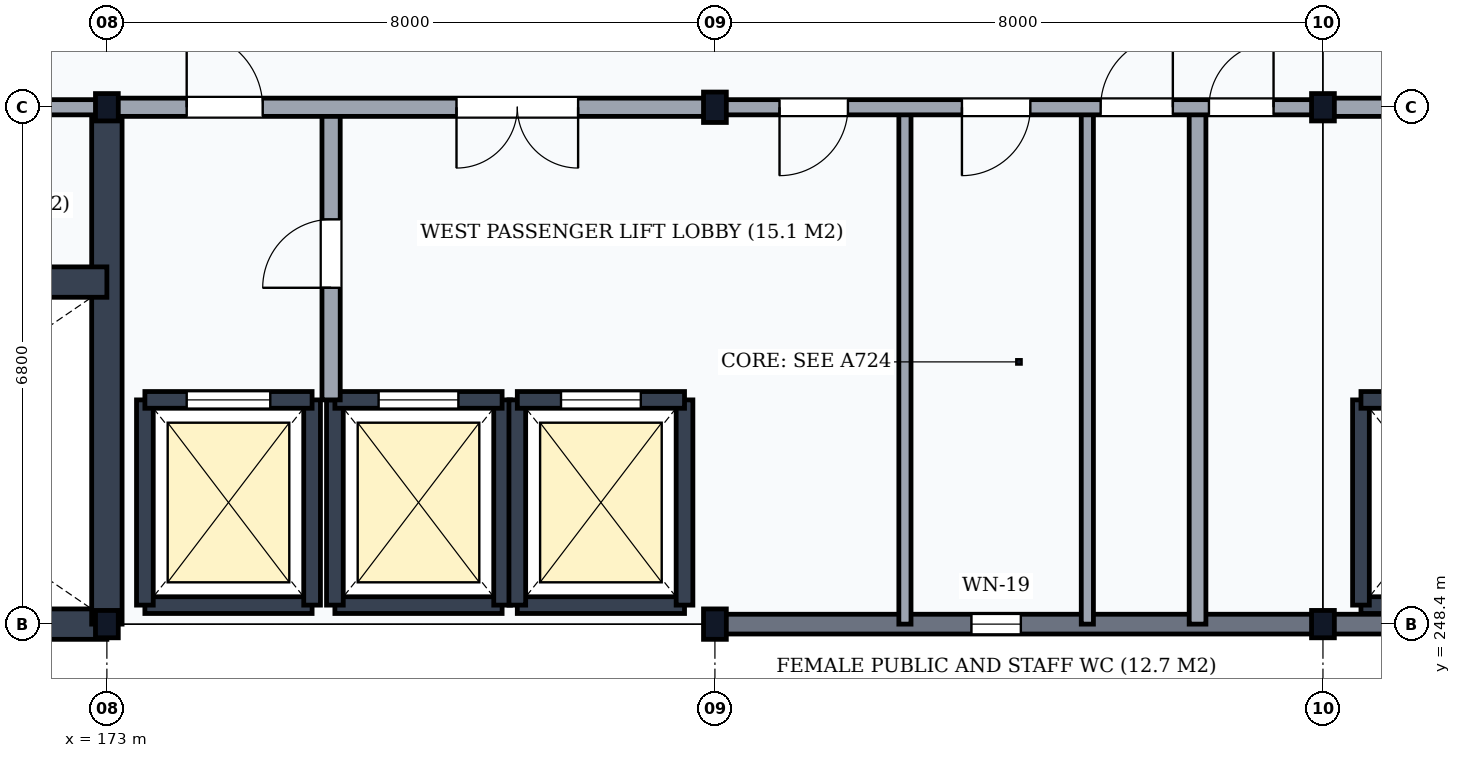
"""IFC4 building model, lengths in metres.
Left out: names, types, materials, properties, quantities, classifications, styles, units other than length and angle.
Written with IfcOpenShell. Run it as: python <this file> out.ifc"""

import sys

from ifc_helpers import new_model, si_unit, direction, frame, frame_2d, origin, origin_2d, place, context, subcontext, project, spatial, rectangle, i_section, extrude, element, fill, save


model = new_model("IFC4")
c1 = context("Model", 3, precision=1e-05, world=origin(), true_north=direction((0.0, 1.0)))
c2 = subcontext(c1, "Body", "Model", "MODEL_VIEW")
j1 = project(units=[si_unit("LENGTHUNIT", "METRE"), si_unit("PLANEANGLEUNIT", "RADIAN")], contexts=[c1])
p1 = place(None, origin())
s1 = spatial("IfcSite", under=j1, at=p1, CompositionType="ELEMENT")
p2 = place(p1, origin())
s2 = spatial("IfcBuilding", under=s1, at=p2, CompositionType="ELEMENT")
p3 = place(p2, frame((0.0, 0.0, 56.1)))
s3 = spatial("IfcBuildingStorey", under=s2, at=p3, CompositionType="ELEMENT", Elevation=56.1)
for number, where, z_axis, x_axis in (
    (1, (173.0, 248.4, 0.0), (0.0, 0.0, 1.0), (1.0, 0.0, 0.0)),
    (2, (173.0, 255.2, 0.0), (0.0, 0.0, 1.0), (1.0, 0.0, 0.0)),
):
    element("IfcColumn", number, at=place(p3, frame(where, z_axis=z_axis, x_axis=x_axis)), inside=s3, PredefinedType="COLUMN", context=c2, shape_type="SweptSolid", body=[
        extrude(i_section(OverallWidth=0.3, OverallDepth=0.36, WebThickness=0.012, FlangeThickness=0.022, FilletRadius=0.027, at=origin_2d()), origin(), (0.0, 0.0, 1.0), 3.9),
    ])
for number, where, z_axis, x_axis in (
    (3, (181.0, 248.4, 0.0), (0.0, 0.0, 1.0), (1.0, 0.0, 0.0)),
    (4, (181.0, 255.2, 0.0), (0.0, 0.0, 1.0), (1.0, 0.0, 0.0)),
):
    element("IfcColumn", number, at=place(p3, frame(where, z_axis=z_axis, x_axis=x_axis)), inside=s3, PredefinedType="COLUMN", context=c2, shape_type="SweptSolid", body=[
        extrude(i_section(OverallWidth=0.3, OverallDepth=0.4, WebThickness=0.013, FlangeThickness=0.024, FilletRadius=0.027, at=origin_2d()), origin(), (0.0, 0.0, 1.0), 3.9),
    ])
for number, where, z_axis, x_axis in (
    (5, (189.0, 248.4, 0.0), (0.0, 0.0, 1.0), (1.0, 0.0, 0.0)),
    (6, (189.0, 255.2, 0.0), (0.0, 0.0, 1.0), (1.0, 0.0, 0.0)),
):
    element("IfcColumn", number, at=place(p3, frame(where, z_axis=z_axis, x_axis=x_axis)), inside=s3, PredefinedType="COLUMN", context=c2, shape_type="SweptSolid", body=[
        extrude(i_section(OverallWidth=0.3, OverallDepth=0.36, WebThickness=0.012, FlangeThickness=0.022, FilletRadius=0.027, at=origin_2d()), origin(), (0.0, 0.0, 1.0), 3.9),
    ])
p4 = place(p3, frame((181.006, 248.4, 0.0), z_axis=(0.0, 0.0, 1.0), x_axis=(1.0, 0.0, 0.0)))
e7 = element("IfcWall", 7, at=p4, inside=s3, PredefinedType="SOLIDWALL", context=c2, shape_type="SweptSolid", body=[
    extrude(rectangle(XDim=7.988, YDim=0.26, at=frame_2d((3.994, 0.0))), origin(), (0.0, 0.0, 1.0), 3.268),
])
p5 = place(p4, frame((3.369, 0.0, 0.95)))
e8 = element("IfcOpeningElement", 8, at=p5, cuts=e7, PredefinedType="OPENING", context=c2, shape_type="SweptSolid", body=[
    extrude(rectangle(XDim=0.65, YDim=1.8, at=frame_2d((0.325, 0.9))), frame((0.0, 0.145, 0.0), z_axis=(0.0, -1.0, 0.0), x_axis=(1.0, 0.0, 0.0)), (0.0, 0.0, 1.0), 0.29),
])
p6 = place(p3, frame((189.006, 248.4, 0.0), z_axis=(0.0, 0.0, 1.0), x_axis=(1.0, 0.0, 0.0)))
e9 = element("IfcWall", 9, at=p6, inside=s3, PredefinedType="SOLIDWALL", context=c2, shape_type="SweptSolid", body=[
    extrude(rectangle(XDim=7.988, YDim=0.26, at=frame_2d((3.994, 0.0))), origin(), (0.0, 0.0, 1.0), 3.268),
])
p7 = place(p3, frame((165.0, 248.4, 0.0), z_axis=(0.0, 0.0, 1.0), x_axis=(1.0, 0.0, 0.0)))
e10 = element("IfcWall", 10, at=p7, inside=s3, PredefinedType="SHEAR", context=c2, shape_type="SweptSolid", body=[
    extrude(rectangle(XDim=8.0, YDim=0.4, at=frame_2d((4.0, 0.0))), origin(), (0.0, 0.0, 1.0), 3.58),
])
p8 = place(p3, frame((173.0, 248.4, 0.0), z_axis=(0.0, 0.0, 1.0), x_axis=(0.0, 1.0, 0.0)))
e11 = element("IfcWall", 11, at=p8, inside=s3, PredefinedType="SHEAR", context=c2, shape_type="SweptSolid", body=[
    extrude(rectangle(XDim=6.8, YDim=0.4, at=frame_2d((3.4, 0.0))), origin(), (0.0, 0.0, 1.0), 3.58),
])
p9 = place(p3, frame((165.0, 252.9, 0.0), z_axis=(0.0, 0.0, 1.0), x_axis=(1.0, 0.0, 0.0)))
e12 = element("IfcWall", 12, at=p9, inside=s3, PredefinedType="SHEAR", context=c2, shape_type="SweptSolid", body=[
    extrude(rectangle(XDim=8.0, YDim=0.4, at=frame_2d((4.0, 0.0))), origin(), (0.0, 0.0, 1.0), 3.58),
])
p10 = place(p9, frame((0.3, 0.0, 0.0)))
e13 = element("IfcOpeningElement", 13, at=p10, cuts=e12, PredefinedType="OPENING", context=c2, shape_type="SweptSolid", body=[
    extrude(rectangle(XDim=1.15, YDim=2.15, at=frame_2d((0.575, 1.075))), frame((0.0, 0.215, 0.0), z_axis=(0.0, -1.0, 0.0), x_axis=(1.0, 0.0, 0.0)), (0.0, 0.0, 1.0), 0.43),
])
p11 = place(p3, frame((165.0, 255.2, 0.0), z_axis=(0.0, 0.0, 1.0), x_axis=(1.0, 0.0, 0.0)))
e14 = element("IfcWall", 14, at=p11, inside=s3, PredefinedType="PARTITIONING", context=c2, shape_type="SweptSolid", body=[
    extrude(rectangle(XDim=8.0, YDim=0.2, at=frame_2d((4.0, 0.0))), origin(), (0.0, 0.0, 1.0), 3.028),
])
p12 = place(p11, frame((3.275, 0.0, 0.0)))
e15 = element("IfcOpeningElement", 15, at=p12, cuts=e14, PredefinedType="OPENING", context=c2, shape_type="SweptSolid", body=[
    extrude(rectangle(XDim=1.45, YDim=2.2, at=frame_2d((0.725, 1.1))), frame((0.0, 0.115, 0.0), z_axis=(0.0, -1.0, 0.0), x_axis=(1.0, 0.0, 0.0)), (0.0, 0.0, 1.0), 0.23),
])
p13 = place(p3, frame((173.5, 248.65, 0.0), z_axis=(0.0, 0.0, 1.0), x_axis=(1.0, 0.0, 0.0)))
e16 = element("IfcWall", 16, at=p13, inside=s3, PredefinedType="SHEAR", context=c2, shape_type="SweptSolid", body=[
    extrude(rectangle(XDim=2.2, YDim=0.22, at=frame_2d((1.1, 0.0))), origin(), (0.0, 0.0, 1.0), 3.58),
])
for number, where, z_axis, x_axis in (
    (17, (173.5, 248.65, 0.0), (0.0, 0.0, 1.0), (0.0, 1.0, 0.0)),
    (18, (175.7, 248.65, 0.0), (0.0, 0.0, 1.0), (0.0, 1.0, 0.0)),
):
    element("IfcWall", number, at=place(p3, frame(where, z_axis=z_axis, x_axis=x_axis)), inside=s3, PredefinedType="SHEAR", context=c2, shape_type="SweptSolid", body=[
        extrude(rectangle(XDim=2.7, YDim=0.22, at=frame_2d((1.35, 0.0))), origin(), (0.0, 0.0, 1.0), 3.58),
    ])
p14 = place(p3, frame((173.5, 251.35, 0.0), z_axis=(0.0, 0.0, 1.0), x_axis=(1.0, 0.0, 0.0)))
e19 = element("IfcWall", 19, at=p14, inside=s3, PredefinedType="SHEAR", context=c2, shape_type="SweptSolid", body=[
    extrude(rectangle(XDim=2.2, YDim=0.22, at=frame_2d((1.1, 0.0))), origin(), (0.0, 0.0, 1.0), 3.58),
])
p15 = place(p14, frame((0.55, 0.0, 0.0)))
e20 = element("IfcOpeningElement", 20, at=p15, cuts=e19, PredefinedType="OPENING", context=c2, shape_type="SweptSolid", body=[
    extrude(rectangle(XDim=1.1, YDim=2.15, at=frame_2d((0.55, 1.075))), frame((0.0, 0.125, 0.0), z_axis=(0.0, -1.0, 0.0), x_axis=(1.0, 0.0, 0.0)), (0.0, 0.0, 1.0), 0.25),
])
p16 = place(p3, frame((176.0, 248.65, 0.0), z_axis=(0.0, 0.0, 1.0), x_axis=(1.0, 0.0, 0.0)))
e21 = element("IfcWall", 21, at=p16, inside=s3, PredefinedType="SHEAR", context=c2, shape_type="SweptSolid", body=[
    extrude(rectangle(XDim=2.2, YDim=0.22, at=frame_2d((1.1, 0.0))), origin(), (0.0, 0.0, 1.0), 3.58),
])
for number, where, z_axis, x_axis in (
    (22, (176.0, 248.65, 0.0), (0.0, 0.0, 1.0), (0.0, 1.0, 0.0)),
    (23, (178.2, 248.65, 0.0), (0.0, 0.0, 1.0), (0.0, 1.0, 0.0)),
):
    element("IfcWall", number, at=place(p3, frame(where, z_axis=z_axis, x_axis=x_axis)), inside=s3, PredefinedType="SHEAR", context=c2, shape_type="SweptSolid", body=[
        extrude(rectangle(XDim=2.7, YDim=0.22, at=frame_2d((1.35, 0.0))), origin(), (0.0, 0.0, 1.0), 3.58),
    ])
p17 = place(p3, frame((176.0, 251.35, 0.0), z_axis=(0.0, 0.0, 1.0), x_axis=(1.0, 0.0, 0.0)))
e24 = element("IfcWall", 24, at=p17, inside=s3, PredefinedType="SHEAR", context=c2, shape_type="SweptSolid", body=[
    extrude(rectangle(XDim=2.2, YDim=0.22, at=frame_2d((1.1, 0.0))), origin(), (0.0, 0.0, 1.0), 3.58),
])
p18 = place(p17, frame((0.575, 0.0, 0.0)))
e25 = element("IfcOpeningElement", 25, at=p18, cuts=e24, PredefinedType="OPENING", context=c2, shape_type="SweptSolid", body=[
    extrude(rectangle(XDim=1.05, YDim=2.15, at=frame_2d((0.525, 1.075))), frame((0.0, 0.125, 0.0), z_axis=(0.0, -1.0, 0.0), x_axis=(1.0, 0.0, 0.0)), (0.0, 0.0, 1.0), 0.25),
])
p19 = place(p3, frame((178.4, 248.65, 0.0), z_axis=(0.0, 0.0, 1.0), x_axis=(1.0, 0.0, 0.0)))
e26 = element("IfcWall", 26, at=p19, inside=s3, PredefinedType="SHEAR", context=c2, shape_type="SweptSolid", body=[
    extrude(rectangle(XDim=2.2, YDim=0.22, at=frame_2d((1.1, 0.0))), origin(), (0.0, 0.0, 1.0), 3.58),
])
for number, where, z_axis, x_axis in (
    (27, (178.4, 248.65, 0.0), (0.0, 0.0, 1.0), (0.0, 1.0, 0.0)),
    (28, (180.6, 248.65, 0.0), (0.0, 0.0, 1.0), (0.0, 1.0, 0.0)),
):
    element("IfcWall", number, at=place(p3, frame(where, z_axis=z_axis, x_axis=x_axis)), inside=s3, PredefinedType="SHEAR", context=c2, shape_type="SweptSolid", body=[
        extrude(rectangle(XDim=2.7, YDim=0.22, at=frame_2d((1.35, 0.0))), origin(), (0.0, 0.0, 1.0), 3.58),
    ])
p20 = place(p3, frame((178.4, 251.35, 0.0), z_axis=(0.0, 0.0, 1.0), x_axis=(1.0, 0.0, 0.0)))
e29 = element("IfcWall", 29, at=p20, inside=s3, PredefinedType="SHEAR", context=c2, shape_type="SweptSolid", body=[
    extrude(rectangle(XDim=2.2, YDim=0.22, at=frame_2d((1.1, 0.0))), origin(), (0.0, 0.0, 1.0), 3.58),
])
p21 = place(p20, frame((0.575, 0.0, 0.0)))
e30 = element("IfcOpeningElement", 30, at=p21, cuts=e29, PredefinedType="OPENING", context=c2, shape_type="SweptSolid", body=[
    extrude(rectangle(XDim=1.05, YDim=2.15, at=frame_2d((0.525, 1.075))), frame((0.0, 0.125, 0.0), z_axis=(0.0, -1.0, 0.0), x_axis=(1.0, 0.0, 0.0)), (0.0, 0.0, 1.0), 0.25),
])
p22 = place(p3, frame((189.5, 248.65, 0.0), z_axis=(0.0, 0.0, 1.0), x_axis=(1.0, 0.0, 0.0)))
e31 = element("IfcWall", 31, at=p22, inside=s3, PredefinedType="SHEAR", context=c2, shape_type="SweptSolid", body=[
    extrude(rectangle(XDim=2.2, YDim=0.22, at=frame_2d((1.1, 0.0))), origin(), (0.0, 0.0, 1.0), 3.58),
])
p23 = place(p3, frame((189.5, 248.65, 0.0), z_axis=(0.0, 0.0, 1.0), x_axis=(0.0, 1.0, 0.0)))
e32 = element("IfcWall", 32, at=p23, inside=s3, PredefinedType="SHEAR", context=c2, shape_type="SweptSolid", body=[
    extrude(rectangle(XDim=2.7, YDim=0.22, at=frame_2d((1.35, 0.0))), origin(), (0.0, 0.0, 1.0), 3.58),
])
p24 = place(p3, frame((189.5, 251.35, 0.0), z_axis=(0.0, 0.0, 1.0), x_axis=(1.0, 0.0, 0.0)))
e33 = element("IfcWall", 33, at=p24, inside=s3, PredefinedType="SHEAR", context=c2, shape_type="SweptSolid", body=[
    extrude(rectangle(XDim=2.2, YDim=0.22, at=frame_2d((1.1, 0.0))), origin(), (0.0, 0.0, 1.0), 3.58),
])
p25 = place(p24, frame((0.55, 0.0, 0.0)))
e34 = element("IfcOpeningElement", 34, at=p25, cuts=e33, PredefinedType="OPENING", context=c2, shape_type="SweptSolid", body=[
    extrude(rectangle(XDim=1.1, YDim=2.15, at=frame_2d((0.55, 1.075))), frame((0.0, 0.125, 0.0), z_axis=(0.0, -1.0, 0.0), x_axis=(1.0, 0.0, 0.0)), (0.0, 0.0, 1.0), 0.25),
])
p26 = place(p3, frame((175.95, 251.35, 0.0), z_axis=(0.0, 0.0, 1.0), x_axis=(0.0, 1.0, 0.0)))
e35 = element("IfcWall", 35, at=p26, inside=s3, PredefinedType="PARTITIONING", context=c2, shape_type="SweptSolid", body=[
    extrude(rectangle(XDim=3.85, YDim=0.24, at=frame_2d((1.925, 0.0))), origin(), (0.0, 0.0, 1.0), 3.58),
])
p27 = place(p26, frame((1.475, 0.0, 0.0)))
e36 = element("IfcOpeningElement", 36, at=p27, cuts=e35, PredefinedType="OPENING", context=c2, shape_type="SweptSolid", body=[
    extrude(rectangle(XDim=0.9, YDim=2.1, at=frame_2d((0.45, 1.05))), frame((0.0, 0.135, 0.0), z_axis=(0.0, -1.0, 0.0), x_axis=(1.0, 0.0, 0.0)), (0.0, 0.0, 1.0), 0.27),
])
for number, where, z_axis, x_axis in (
    (37, (183.5, 248.4, 0.0), (0.0, 0.0, 1.0), (0.0, 1.0, 0.0)),
    (38, (185.9, 248.4, 0.0), (0.0, 0.0, 1.0), (0.0, 1.0, 0.0)),
):
    element("IfcWall", number, at=place(p3, frame(where, z_axis=z_axis, x_axis=x_axis)), inside=s3, PredefinedType="PARTITIONING", context=c2, shape_type="SweptSolid", body=[
        extrude(rectangle(XDim=6.8, YDim=0.16, at=frame_2d((3.4, 0.0))), origin(), (0.0, 0.0, 1.0), 3.58),
    ])
p28 = place(p3, frame((187.35, 248.4, 0.0), z_axis=(0.0, 0.0, 1.0), x_axis=(0.0, 1.0, 0.0)))
e39 = element("IfcWall", 39, at=p28, inside=s3, PredefinedType="PARTITIONING", context=c2, shape_type="SweptSolid", body=[
    extrude(rectangle(XDim=6.8, YDim=0.22, at=frame_2d((3.4, 0.0))), origin(), (0.0, 0.0, 1.0), 3.58),
])
p29 = place(p3, frame((173.0, 255.2, 0.0), z_axis=(0.0, 0.0, 1.0), x_axis=(1.0, 0.0, 0.0)))
e40 = element("IfcWall", 40, at=p29, inside=s3, PredefinedType="PARTITIONING", context=c2, shape_type="SweptSolid", body=[
    extrude(rectangle(XDim=8.0, YDim=0.24, at=frame_2d((4.0, 0.0))), origin(), (0.0, 0.0, 1.0), 3.028),
])
p30 = place(p29, frame((1.05, 0.0, 0.0)))
e41 = element("IfcOpeningElement", 41, at=p30, cuts=e40, PredefinedType="OPENING", context=c2, shape_type="SweptSolid", body=[
    extrude(rectangle(XDim=1.0, YDim=2.1, at=frame_2d((0.5, 1.05))), frame((0.0, 0.135, 0.0), z_axis=(0.0, -1.0, 0.0), x_axis=(1.0, 0.0, 0.0)), (0.0, 0.0, 1.0), 0.27),
])
p31 = place(p29, frame((4.6, 0.0, 0.0)))
e42 = element("IfcOpeningElement", 42, at=p31, cuts=e40, PredefinedType="OPENING", context=c2, shape_type="SweptSolid", body=[
    extrude(rectangle(XDim=1.6, YDim=2.25, at=frame_2d((0.8, 1.125))), frame((0.0, 0.135, 0.0), z_axis=(0.0, -1.0, 0.0), x_axis=(1.0, 0.0, 0.0)), (0.0, 0.0, 1.0), 0.27),
])
p32 = place(p3, frame((181.0, 255.2, 0.0), z_axis=(0.0, 0.0, 1.0), x_axis=(1.0, 0.0, 0.0)))
e43 = element("IfcWall", 43, at=p32, inside=s3, PredefinedType="PARTITIONING", context=c2, shape_type="SweptSolid", body=[
    extrude(rectangle(XDim=8.0, YDim=0.2, at=frame_2d((4.0, 0.0))), origin(), (0.0, 0.0, 1.0), 3.028),
])
p33 = place(p32, frame((0.85, 0.0, 0.0)))
e44 = element("IfcOpeningElement", 44, at=p33, cuts=e43, PredefinedType="OPENING", context=c2, shape_type="SweptSolid", body=[
    extrude(rectangle(XDim=0.9, YDim=2.1, at=frame_2d((0.45, 1.05))), frame((0.0, 0.115, 0.0), z_axis=(0.0, -1.0, 0.0), x_axis=(1.0, 0.0, 0.0)), (0.0, 0.0, 1.0), 0.23),
])
p34 = place(p32, frame((3.25, 0.0, 0.0)))
e45 = element("IfcOpeningElement", 45, at=p34, cuts=e43, PredefinedType="OPENING", context=c2, shape_type="SweptSolid", body=[
    extrude(rectangle(XDim=0.9, YDim=2.1, at=frame_2d((0.45, 1.05))), frame((0.0, 0.115, 0.0), z_axis=(0.0, -1.0, 0.0), x_axis=(1.0, 0.0, 0.0)), (0.0, 0.0, 1.0), 0.23),
])
p35 = place(p32, frame((5.075, 0.0, 0.0)))
e46 = element("IfcOpeningElement", 46, at=p35, cuts=e43, PredefinedType="OPENING", context=c2, shape_type="SweptSolid", body=[
    extrude(rectangle(XDim=0.95, YDim=2.1, at=frame_2d((0.475, 1.05))), frame((0.0, 0.115, 0.0), z_axis=(0.0, -1.0, 0.0), x_axis=(1.0, 0.0, 0.0)), (0.0, 0.0, 1.0), 0.23),
])
p36 = place(p32, frame((6.5, 0.0, 0.0)))
e47 = element("IfcOpeningElement", 47, at=p36, cuts=e43, PredefinedType="OPENING", context=c2, shape_type="SweptSolid", body=[
    extrude(rectangle(XDim=0.85, YDim=2.1, at=frame_2d((0.425, 1.05))), frame((0.0, 0.115, 0.0), z_axis=(0.0, -1.0, 0.0), x_axis=(1.0, 0.0, 0.0)), (0.0, 0.0, 1.0), 0.23),
])
p37 = place(p3, frame((189.0, 255.2, 0.0), z_axis=(0.0, 0.0, 1.0), x_axis=(1.0, 0.0, 0.0)))
e48 = element("IfcWall", 48, at=p37, inside=s3, PredefinedType="PARTITIONING", context=c2, shape_type="SweptSolid", body=[
    extrude(rectangle(XDim=8.0, YDim=0.24, at=frame_2d((4.0, 0.0))), origin(), (0.0, 0.0, 1.0), 3.028),
])
p38 = place(p37, frame((1.05, 0.0, 0.0)))
e49 = element("IfcOpeningElement", 49, at=p38, cuts=e48, PredefinedType="OPENING", context=c2, shape_type="SweptSolid", body=[
    extrude(rectangle(XDim=1.0, YDim=2.1, at=frame_2d((0.5, 1.05))), frame((0.0, 0.135, 0.0), z_axis=(0.0, -1.0, 0.0), x_axis=(1.0, 0.0, 0.0)), (0.0, 0.0, 1.0), 0.27),
])
p39 = place(p37, frame((3.6, 0.0, 0.0)))
e50 = element("IfcOpeningElement", 50, at=p39, cuts=e48, PredefinedType="OPENING", context=c2, shape_type="SweptSolid", body=[
    extrude(rectangle(XDim=1.5, YDim=2.25, at=frame_2d((0.75, 1.125))), frame((0.0, 0.135, 0.0), z_axis=(0.0, -1.0, 0.0), x_axis=(1.0, 0.0, 0.0)), (0.0, 0.0, 1.0), 0.27),
])
p40 = place(p37, frame((6.425, 0.0, 0.0)))
e51 = element("IfcOpeningElement", 51, at=p40, cuts=e48, PredefinedType="OPENING", context=c2, shape_type="SweptSolid", body=[
    extrude(rectangle(XDim=0.85, YDim=2.1, at=frame_2d((0.425, 1.05))), frame((0.0, 0.135, 0.0), z_axis=(0.0, -1.0, 0.0), x_axis=(1.0, 0.0, 0.0)), (0.0, 0.0, 1.0), 0.27),
])
p41 = place(p5, origin())
e52 = element("IfcWindow", 52, at=p41, inside=s3, PartitioningType="SINGLE_PANEL", PredefinedType="WINDOW", context=c2, shape_type="SweptSolid", body=[
    extrude(rectangle(XDim=0.65, YDim=1.8, at=frame_2d((0.325, 0.9))), frame((0.0, 0.03, 0.0), z_axis=(0.0, -1.0, 0.0), x_axis=(1.0, 0.0, 0.0)), (0.0, 0.0, 1.0), 0.06),
])
fill(e8, e52)
p42 = place(p15, origin())
e53 = element("IfcDoor", 53, at=p42, inside=s3, OperationType="DOUBLE_DOOR_SLIDING", PredefinedType="USERDEFINED", context=c2, shape_type="SweptSolid", body=[
    extrude(rectangle(XDim=1.1, YDim=2.15, at=frame_2d((0.55, 1.075))), frame((0.0, 0.025, 0.0), z_axis=(0.0, -1.0, 0.0), x_axis=(1.0, 0.0, 0.0)), (0.0, 0.0, 1.0), 0.05),
])
fill(e20, e53)
p43 = place(p18, origin())
e54 = element("IfcDoor", 54, at=p43, inside=s3, OperationType="DOUBLE_DOOR_SLIDING", PredefinedType="USERDEFINED", context=c2, shape_type="SweptSolid", body=[
    extrude(rectangle(XDim=1.05, YDim=2.15, at=frame_2d((0.525, 1.075))), frame((0.0, 0.025, 0.0), z_axis=(0.0, -1.0, 0.0), x_axis=(1.0, 0.0, 0.0)), (0.0, 0.0, 1.0), 0.05),
])
fill(e25, e54)
p44 = place(p21, origin())
e55 = element("IfcDoor", 55, at=p44, inside=s3, OperationType="DOUBLE_DOOR_SLIDING", PredefinedType="USERDEFINED", context=c2, shape_type="SweptSolid", body=[
    extrude(rectangle(XDim=1.05, YDim=2.15, at=frame_2d((0.525, 1.075))), frame((0.0, 0.025, 0.0), z_axis=(0.0, -1.0, 0.0), x_axis=(1.0, 0.0, 0.0)), (0.0, 0.0, 1.0), 0.05),
])
fill(e30, e55)
p45 = place(p27, origin())
e56 = element("IfcDoor", 56, at=p45, inside=s3, OperationType="SINGLE_SWING_LEFT", PredefinedType="DOOR", context=c2, shape_type="SweptSolid", body=[
    extrude(rectangle(XDim=0.9, YDim=2.1, at=frame_2d((0.45, 1.05))), frame((0.0, 0.025, 0.0), z_axis=(0.0, -1.0, 0.0), x_axis=(1.0, 0.0, 0.0)), (0.0, 0.0, 1.0), 0.05),
])
fill(e36, e56)
p46 = place(p30, origin())
e57 = element("IfcDoor", 57, at=p46, inside=s3, OperationType="SINGLE_SWING_LEFT", PredefinedType="DOOR", context=c2, shape_type="SweptSolid", body=[
    extrude(rectangle(XDim=1.0, YDim=2.1, at=frame_2d((0.5, 1.05))), frame((0.0, 0.025, 0.0), z_axis=(0.0, -1.0, 0.0), x_axis=(1.0, 0.0, 0.0)), (0.0, 0.0, 1.0), 0.05),
])
fill(e41, e57)
p47 = place(p31, frame((1.6, 0.0, 0.0), z_axis=(0.0, 0.0, 1.0), x_axis=(-1.0, 0.0, 0.0)))
e58 = element("IfcDoor", 58, at=p47, inside=s3, OperationType="DOUBLE_DOOR_SINGLE_SWING", PredefinedType="DOOR", context=c2, shape_type="SweptSolid", body=[
    extrude(rectangle(XDim=1.6, YDim=2.25, at=frame_2d((0.8, 1.125))), frame((0.0, 0.025, 0.0), z_axis=(0.0, -1.0, 0.0), x_axis=(1.0, 0.0, 0.0)), (0.0, 0.0, 1.0), 0.05),
])
fill(e42, e58)
p48 = place(p33, frame((0.9, 0.0, 0.0), z_axis=(0.0, 0.0, 1.0), x_axis=(-1.0, 0.0, 0.0)))
e59 = element("IfcDoor", 59, at=p48, inside=s3, OperationType="SINGLE_SWING_RIGHT", PredefinedType="DOOR", context=c2, shape_type="SweptSolid", body=[
    extrude(rectangle(XDim=0.9, YDim=2.1, at=frame_2d((0.45, 1.05))), frame((0.0, 0.025, 0.0), z_axis=(0.0, -1.0, 0.0), x_axis=(1.0, 0.0, 0.0)), (0.0, 0.0, 1.0), 0.05),
])
fill(e44, e59)
p49 = place(p34, frame((0.9, 0.0, 0.0), z_axis=(0.0, 0.0, 1.0), x_axis=(-1.0, 0.0, 0.0)))
e60 = element("IfcDoor", 60, at=p49, inside=s3, OperationType="SINGLE_SWING_RIGHT", PredefinedType="DOOR", context=c2, shape_type="SweptSolid", body=[
    extrude(rectangle(XDim=0.9, YDim=2.1, at=frame_2d((0.45, 1.05))), frame((0.0, 0.025, 0.0), z_axis=(0.0, -1.0, 0.0), x_axis=(1.0, 0.0, 0.0)), (0.0, 0.0, 1.0), 0.05),
])
fill(e45, e60)
p50 = place(p35, frame((0.95, 0.0, 0.0), z_axis=(0.0, 0.0, 1.0), x_axis=(-1.0, 0.0, 0.0)))
e61 = element("IfcDoor", 61, at=p50, inside=s3, OperationType="SINGLE_SWING_LEFT", PredefinedType="DOOR", context=c2, shape_type="SweptSolid", body=[
    extrude(rectangle(XDim=0.95, YDim=2.1, at=frame_2d((0.475, 1.05))), frame((0.0, 0.025, 0.0), z_axis=(0.0, -1.0, 0.0), x_axis=(1.0, 0.0, 0.0)), (0.0, 0.0, 1.0), 0.05),
])
fill(e46, e61)
p51 = place(p36, frame((0.85, 0.0, 0.0), z_axis=(0.0, 0.0, 1.0), x_axis=(-1.0, 0.0, 0.0)))
e62 = element("IfcDoor", 62, at=p51, inside=s3, OperationType="SINGLE_SWING_LEFT", PredefinedType="DOOR", context=c2, shape_type="SweptSolid", body=[
    extrude(rectangle(XDim=0.85, YDim=2.1, at=frame_2d((0.425, 1.05))), frame((0.0, 0.025, 0.0), z_axis=(0.0, -1.0, 0.0), x_axis=(1.0, 0.0, 0.0)), (0.0, 0.0, 1.0), 0.05),
])
fill(e47, e62)
save(model, sys.argv[1])
